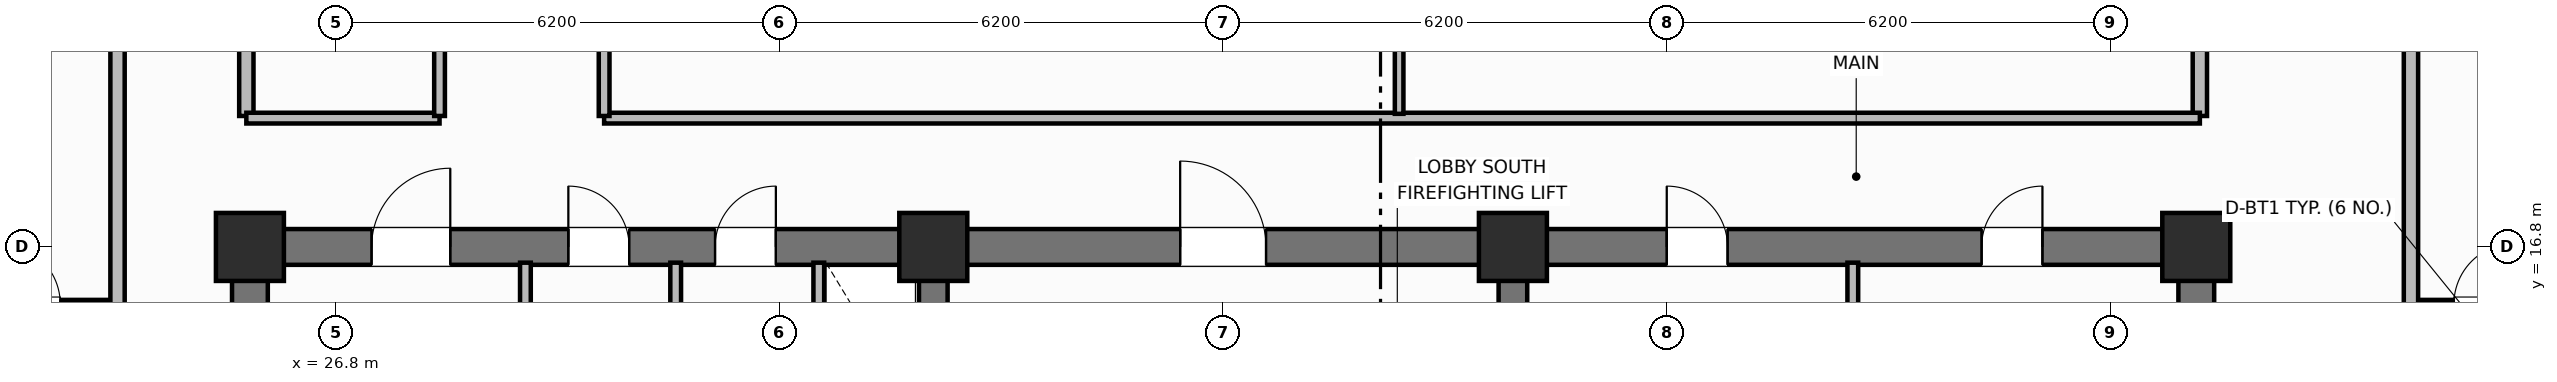
"""IFC4 building model, lengths in metres.
Left out: names, types, materials, properties, quantities, classifications, styles, units other than length and angle.
Written with IfcOpenShell. Run it as: python <this file> out.ifc"""

import sys

from ifc_helpers import new_model, si_unit, direction, frame, frame_2d, origin, origin_2d, place, context, subcontext, project, spatial, rectangle, extrude, element, fill, save


model = new_model("IFC4")
c1 = context("Model", 3, precision=1e-05, world=origin(), true_north=direction((0.0, 1.0)))
c2 = subcontext(c1, "Body", "Model", "MODEL_VIEW")
j1 = project(units=[si_unit("LENGTHUNIT", "METRE"), si_unit("PLANEANGLEUNIT", "RADIAN")], contexts=[c1])
p1 = place(None, origin())
s1 = spatial("IfcSite", under=j1, at=p1, CompositionType="ELEMENT")
p2 = place(p1, origin())
s2 = spatial("IfcBuilding", under=s1, at=p2, CompositionType="ELEMENT")
p3 = place(p2, frame((0.0, 0.0, 192.2)))
s3 = spatial("IfcBuildingStorey", under=s2, at=p3, CompositionType="ELEMENT", Elevation=192.2)
for number, where, z_axis, x_axis in (
    (1, (25.6, 10.85, 0.0), (0.0, 0.0, 1.0), (0.0, 1.0, 0.0)),
    (2, (52.8, 10.85, 0.0), (0.0, 0.0, 1.0), (0.0, 1.0, 0.0)),
):
    element("IfcWall", number, at=place(p3, frame(where, z_axis=z_axis, x_axis=x_axis)), inside=s3, PredefinedType="SHEAR", context=c2, shape_type="SweptSolid", body=[
        extrude(rectangle(XDim=5.7, YDim=0.5, at=frame_2d((2.85, 0.0))), origin(), (0.0, 0.0, 1.0), 3.7),
    ])
p4 = place(p3, frame((25.6, 16.8, 0.0), z_axis=(0.0, 0.0, 1.0), x_axis=(1.0, 0.0, 0.0)))
e3 = element("IfcWall", 3, at=p4, inside=s3, PredefinedType="SHEAR", context=c2, shape_type="SweptSolid", body=[
    extrude(rectangle(XDim=27.2, YDim=0.5, at=frame_2d((13.6, 0.0))), origin(), (0.0, 0.0, 1.0), 3.7),
])
p5 = place(p4, frame((1.7, 0.0, 0.0)))
e4 = element("IfcOpeningElement", 4, at=p5, cuts=e3, PredefinedType="OPENING", context=c2, shape_type="SweptSolid", body=[
    extrude(rectangle(XDim=1.1, YDim=2.15, at=frame_2d((0.55, 1.075))), frame((0.0, 0.26, 0.0), z_axis=(0.0, -1.0, 0.0), x_axis=(1.0, 0.0, 0.0)), (0.0, 0.0, 1.0), 0.52),
])
p6 = place(p4, frame((4.45, 0.0, 0.0)))
e5 = element("IfcOpeningElement", 5, at=p6, cuts=e3, PredefinedType="OPENING", context=c2, shape_type="SweptSolid", body=[
    extrude(rectangle(XDim=0.85, YDim=2.1, at=frame_2d((0.425, 1.05))), frame((0.0, 0.26, 0.0), z_axis=(0.0, -1.0, 0.0), x_axis=(1.0, 0.0, 0.0)), (0.0, 0.0, 1.0), 0.52),
])
p7 = place(p4, frame((6.5, 0.0, 0.0)))
e6 = element("IfcOpeningElement", 6, at=p7, cuts=e3, PredefinedType="OPENING", context=c2, shape_type="SweptSolid", body=[
    extrude(rectangle(XDim=0.85, YDim=2.1, at=frame_2d((0.425, 1.05))), frame((0.0, 0.26, 0.0), z_axis=(0.0, -1.0, 0.0), x_axis=(1.0, 0.0, 0.0)), (0.0, 0.0, 1.0), 0.52),
])
p8 = place(p4, frame((13.0, 0.0, 0.0)))
e7 = element("IfcOpeningElement", 7, at=p8, cuts=e3, PredefinedType="OPENING", context=c2, shape_type="SweptSolid", body=[
    extrude(rectangle(XDim=1.2, YDim=2.15, at=frame_2d((0.6, 1.075))), frame((0.0, 0.26, 0.0), z_axis=(0.0, -1.0, 0.0), x_axis=(1.0, 0.0, 0.0)), (0.0, 0.0, 1.0), 0.52),
])
p9 = place(p4, frame((19.8, 0.0, 0.0)))
e8 = element("IfcOpeningElement", 8, at=p9, cuts=e3, PredefinedType="OPENING", context=c2, shape_type="SweptSolid", body=[
    extrude(rectangle(XDim=0.85, YDim=2.1, at=frame_2d((0.425, 1.05))), frame((0.0, 0.26, 0.0), z_axis=(0.0, -1.0, 0.0), x_axis=(1.0, 0.0, 0.0)), (0.0, 0.0, 1.0), 0.52),
])
p10 = place(p4, frame((24.2, 0.0, 0.0)))
e9 = element("IfcOpeningElement", 9, at=p10, cuts=e3, PredefinedType="OPENING", context=c2, shape_type="SweptSolid", body=[
    extrude(rectangle(XDim=0.85, YDim=2.1, at=frame_2d((0.425, 1.05))), frame((0.0, 0.26, 0.0), z_axis=(0.0, -1.0, 0.0), x_axis=(1.0, 0.0, 0.0)), (0.0, 0.0, 1.0), 0.52),
])
for number, where, z_axis, x_axis in (
    (10, (35.15, 10.85, 0.0), (0.0, 0.0, 1.0), (0.0, 1.0, 0.0)),
    (11, (43.25, 10.85, 0.0), (0.0, 0.0, 1.0), (0.0, 1.0, 0.0)),
):
    element("IfcWall", number, at=place(p3, frame(where, z_axis=z_axis, x_axis=x_axis)), inside=s3, PredefinedType="SHEAR", context=c2, shape_type="SweptSolid", body=[
        extrude(rectangle(XDim=5.7, YDim=0.4, at=frame_2d((2.85, 0.0))), origin(), (0.0, 0.0, 1.0), 3.7),
    ])
for number, where, z_axis, x_axis in (
    (12, (25.6, 16.8, 0.0), (0.0, 0.0, 1.0), (1.0, 0.0, 0.0)),
    (13, (35.15, 16.8, 0.0), (0.0, 0.0, 1.0), (1.0, 0.0, 0.0)),
    (14, (43.25, 16.8, 0.0), (0.0, 0.0, 1.0), (1.0, 0.0, 0.0)),
    (15, (52.8, 16.8, 0.0), (0.0, 0.0, 1.0), (1.0, 0.0, 0.0)),
):
    element("IfcColumn", number, at=place(p3, frame(where, z_axis=z_axis, x_axis=x_axis)), inside=s3, PredefinedType="COLUMN", context=c2, shape_type="SweptSolid", body=[
        extrude(rectangle(XDim=0.95, YDim=0.95, at=origin_2d()), origin(), (0.0, 0.0, 1.0), 3.7),
    ])
for number, where, z_axis, x_axis in (
    (16, (29.45, 14.5, 0.0), (0.0, 0.0, 1.0), (0.0, 1.0, 0.0)),
    (17, (31.55, 14.5, 0.0), (0.0, 0.0, 1.0), (0.0, 1.0, 0.0)),
):
    element("IfcWall", number, at=place(p3, frame(where, z_axis=z_axis, x_axis=x_axis)), inside=s3, PredefinedType="PARTITIONING", context=c2, shape_type="SweptSolid", body=[
        extrude(rectangle(XDim=2.08, YDim=0.15, at=frame_2d((1.04, 0.0))), origin(), (0.0, 0.0, 1.0), 2.49),
    ])
p11 = place(p3, frame((33.55, 14.5, 0.0), z_axis=(0.0, 0.0, 1.0), x_axis=(0.0, 1.0, 0.0)))
e18 = element("IfcWall", 18, at=p11, inside=s3, PredefinedType="PARTITIONING", context=c2, shape_type="SweptSolid", body=[
    extrude(rectangle(XDim=2.08, YDim=0.15, at=frame_2d((1.04, 0.0))), origin(), (0.0, 0.0, 1.0), 2.49),
])
p12 = place(p11, frame((0.55, 0.0, 0.0)))
e19 = element("IfcOpeningElement", 19, at=p12, cuts=e18, PredefinedType="OPENING", context=c2, shape_type="SweptSolid", body=[
    extrude(rectangle(XDim=0.85, YDim=2.05, at=frame_2d((0.425, 1.025))), frame((0.0, 0.085, 0.0), z_axis=(0.0, -1.0, 0.0), x_axis=(1.0, 0.0, 0.0)), (0.0, 0.0, 1.0), 0.17),
])
p13 = place(p3, frame((48.0, 10.95, 0.0), z_axis=(0.0, 0.0, 1.0), x_axis=(0.0, 1.0, 0.0)))
e20 = element("IfcWall", 20, at=p13, inside=s3, PredefinedType="PARTITIONING", context=c2, shape_type="SweptSolid", body=[
    extrude(rectangle(XDim=5.63, YDim=0.15, at=frame_2d((2.815, 0.0))), origin(), (0.0, 0.0, 1.0), 2.49),
])
for number, where, z_axis, x_axis in (
    (21, (25.55, 18.63, 0.0), (0.0, 0.0, 1.0), (0.0, 1.0, 0.0)),
    (22, (52.85, 18.63, 0.0), (0.0, 0.0, 1.0), (0.0, 1.0, 0.0)),
):
    element("IfcWall", number, at=place(p3, frame(where, z_axis=z_axis, x_axis=x_axis)), inside=s3, PredefinedType="PARTITIONING", context=c2, shape_type="SweptSolid", body=[
        extrude(rectangle(XDim=19.14, YDim=0.2, at=frame_2d((9.57, 0.0))), origin(), (0.0, 0.0, 1.0), 2.49),
    ])
p14 = place(p3, frame((25.55, 18.6, 0.0), z_axis=(0.0, 0.0, 1.0), x_axis=(1.0, 0.0, 0.0)))
e23 = element("IfcWall", 23, at=p14, inside=s3, PredefinedType="PARTITIONING", context=c2, shape_type="SweptSolid", body=[
    extrude(rectangle(XDim=2.7, YDim=0.15, at=frame_2d((1.35, 0.0))), origin(), (0.0, 0.0, 1.0), 2.49),
])
p15 = place(p3, frame((30.55, 18.6, 0.0), z_axis=(0.0, 0.0, 1.0), x_axis=(1.0, 0.0, 0.0)))
e24 = element("IfcWall", 24, at=p15, inside=s3, PredefinedType="PARTITIONING", context=c2, shape_type="SweptSolid", body=[
    extrude(rectangle(XDim=22.3, YDim=0.15, at=frame_2d((11.15, 0.0))), origin(), (0.0, 0.0, 1.0), 2.49),
])
p16 = place(p3, frame((41.66, 18.66, 0.0), z_axis=(0.0, 0.0, 1.0), x_axis=(0.0, 1.0, 0.0)))
e25 = element("IfcWall", 25, at=p16, inside=s3, PredefinedType="PARTITIONING", context=c2, shape_type="SweptSolid", body=[
    extrude(rectangle(XDim=6.821, YDim=0.12, at=frame_2d((3.41, 0.0))), origin(), (0.0, 0.0, 1.0), 2.49),
])
p17 = place(p16, frame((2.0, 0.0, 0.0)))
e26 = element("IfcOpeningElement", 26, at=p17, cuts=e25, PredefinedType="OPENING", context=c2, shape_type="SweptSolid", body=[
    extrude(rectangle(XDim=0.9, YDim=2.1, at=frame_2d((0.45, 1.05))), frame((0.0, 0.07, 0.0), z_axis=(0.0, -1.0, 0.0), x_axis=(1.0, 0.0, 0.0)), (0.0, 0.0, 1.0), 0.14),
])
p18 = place(p3, frame((28.25, 18.63, 0.0), z_axis=(0.0, 0.0, 1.0), x_axis=(0.0, 1.0, 0.0)))
e27 = element("IfcWall", 27, at=p18, inside=s3, PredefinedType="PARTITIONING", context=c2, shape_type="SweptSolid", body=[
    extrude(rectangle(XDim=19.14, YDim=0.15, at=frame_2d((9.57, 0.0))), origin(), (0.0, 0.0, 1.0), 2.49),
])
p19 = place(p18, frame((3.0, 0.0, 0.0)))
e28 = element("IfcOpeningElement", 28, at=p19, cuts=e27, PredefinedType="OPENING", context=c2, shape_type="SweptSolid", body=[
    extrude(rectangle(XDim=0.9, YDim=2.1, at=frame_2d((0.45, 1.05))), frame((0.0, 0.085, 0.0), z_axis=(0.0, -1.0, 0.0), x_axis=(1.0, 0.0, 0.0)), (0.0, 0.0, 1.0), 0.17),
])
p20 = place(p18, frame((11.5, 0.0, 0.0)))
e29 = element("IfcOpeningElement", 29, at=p20, cuts=e27, PredefinedType="OPENING", context=c2, shape_type="SweptSolid", body=[
    extrude(rectangle(XDim=0.9, YDim=2.1, at=frame_2d((0.45, 1.05))), frame((0.0, 0.085, 0.0), z_axis=(0.0, -1.0, 0.0), x_axis=(1.0, 0.0, 0.0)), (0.0, 0.0, 1.0), 0.17),
])
p21 = place(p3, frame((30.55, 18.63, 0.0), z_axis=(0.0, 0.0, 1.0), x_axis=(0.0, 1.0, 0.0)))
e30 = element("IfcWall", 30, at=p21, inside=s3, PredefinedType="PARTITIONING", context=c2, shape_type="SweptSolid", body=[
    extrude(rectangle(XDim=19.14, YDim=0.15, at=frame_2d((9.57, 0.0))), origin(), (0.0, 0.0, 1.0), 2.49),
])
p22 = place(p21, frame((2.2, 0.0, 0.0)))
e31 = element("IfcOpeningElement", 31, at=p22, cuts=e30, PredefinedType="OPENING", context=c2, shape_type="SweptSolid", body=[
    extrude(rectangle(XDim=1.0, YDim=2.15, at=frame_2d((0.5, 1.075))), frame((0.0, 0.085, 0.0), z_axis=(0.0, -1.0, 0.0), x_axis=(1.0, 0.0, 0.0)), (0.0, 0.0, 1.0), 0.17),
])
p23 = place(p21, frame((8.89, 0.0, 0.0)))
e32 = element("IfcOpeningElement", 32, at=p23, cuts=e30, PredefinedType="OPENING", context=c2, shape_type="SweptSolid", body=[
    extrude(rectangle(XDim=1.0, YDim=2.15, at=frame_2d((0.5, 1.075))), frame((0.0, 0.085, 0.0), z_axis=(0.0, -1.0, 0.0), x_axis=(1.0, 0.0, 0.0)), (0.0, 0.0, 1.0), 0.17),
])
p24 = place(p3, frame((21.5, 16.0, 0.0), z_axis=(0.0, 0.0, 1.0), x_axis=(1.0, 0.0, 0.0)))
e33 = element("IfcWall", 33, at=p24, inside=s3, PredefinedType="PARTITIONING", context=c2, shape_type="SweptSolid", body=[
    extrude(rectangle(XDim=2.25, YDim=0.12, at=frame_2d((1.125, 0.0))), origin(), (0.0, 0.0, 1.0), 2.49),
])
p25 = place(p24, frame((0.6, 0.0, 0.0)))
e34 = element("IfcOpeningElement", 34, at=p25, cuts=e33, PredefinedType="OPENING", context=c2, shape_type="SweptSolid", body=[
    extrude(rectangle(XDim=0.85, YDim=2.1, at=frame_2d((0.425, 1.05))), frame((0.0, 0.07, 0.0), z_axis=(0.0, -1.0, 0.0), x_axis=(1.0, 0.0, 0.0)), (0.0, 0.0, 1.0), 0.14),
])
p26 = place(p3, frame((23.75, 10.6, 0.0), z_axis=(0.0, 0.0, 1.0), x_axis=(0.0, 1.0, 0.0)))
e35 = element("IfcWall", 35, at=p26, inside=s3, PredefinedType="PARTITIONING", context=c2, shape_type="SweptSolid", body=[
    extrude(rectangle(XDim=35.2, YDim=0.2, at=frame_2d((17.6, 0.0))), origin(), (0.0, 0.0, 1.0), 2.49),
])
p27 = place(p26, frame((2.65, 0.0, 0.0)))
e36 = element("IfcOpeningElement", 36, at=p27, cuts=e35, PredefinedType="OPENING", context=c2, shape_type="SweptSolid", body=[
    extrude(rectangle(XDim=1.0, YDim=2.15, at=frame_2d((0.5, 1.075))), frame((0.0, 0.11, 0.0), z_axis=(0.0, -1.0, 0.0), x_axis=(1.0, 0.0, 0.0)), (0.0, 0.0, 1.0), 0.22),
])
p28 = place(p26, frame((13.222, 0.0, 0.0)))
e37 = element("IfcOpeningElement", 37, at=p28, cuts=e35, PredefinedType="OPENING", context=c2, shape_type="SweptSolid", body=[
    extrude(rectangle(XDim=1.0, YDim=2.15, at=frame_2d((0.5, 1.075))), frame((0.0, 0.11, 0.0), z_axis=(0.0, -1.0, 0.0), x_axis=(1.0, 0.0, 0.0)), (0.0, 0.0, 1.0), 0.22),
])
p29 = place(p26, frame((24.838, 0.0, 0.0)))
e38 = element("IfcOpeningElement", 38, at=p29, cuts=e35, PredefinedType="OPENING", context=c2, shape_type="SweptSolid", body=[
    extrude(rectangle(XDim=1.0, YDim=2.15, at=frame_2d((0.5, 1.075))), frame((0.0, 0.11, 0.0), z_axis=(0.0, -1.0, 0.0), x_axis=(1.0, 0.0, 0.0)), (0.0, 0.0, 1.0), 0.22),
])
p30 = place(p3, frame((55.8, 16.0, 0.0), z_axis=(0.0, 0.0, 1.0), x_axis=(1.0, 0.0, 0.0)))
e39 = element("IfcWall", 39, at=p30, inside=s3, PredefinedType="PARTITIONING", context=c2, shape_type="SweptSolid", body=[
    extrude(rectangle(XDim=2.25, YDim=0.12, at=frame_2d((1.125, 0.0))), origin(), (0.0, 0.0, 1.0), 2.49),
])
p31 = place(p30, frame((0.6, 0.0, 0.0)))
e40 = element("IfcOpeningElement", 40, at=p31, cuts=e39, PredefinedType="OPENING", context=c2, shape_type="SweptSolid", body=[
    extrude(rectangle(XDim=0.85, YDim=2.1, at=frame_2d((0.425, 1.05))), frame((0.0, 0.07, 0.0), z_axis=(0.0, -1.0, 0.0), x_axis=(1.0, 0.0, 0.0)), (0.0, 0.0, 1.0), 0.14),
])
p32 = place(p3, frame((55.8, 10.6, 0.0), z_axis=(0.0, 0.0, 1.0), x_axis=(0.0, 1.0, 0.0)))
e41 = element("IfcWall", 41, at=p32, inside=s3, PredefinedType="PARTITIONING", context=c2, shape_type="SweptSolid", body=[
    extrude(rectangle(XDim=35.2, YDim=0.2, at=frame_2d((17.6, 0.0))), origin(), (0.0, 0.0, 1.0), 2.49),
])
p33 = place(p32, frame((2.65, 0.0, 0.0)))
e42 = element("IfcOpeningElement", 42, at=p33, cuts=e41, PredefinedType="OPENING", context=c2, shape_type="SweptSolid", body=[
    extrude(rectangle(XDim=1.0, YDim=2.15, at=frame_2d((0.5, 1.075))), frame((0.0, 0.11, 0.0), z_axis=(0.0, -1.0, 0.0), x_axis=(1.0, 0.0, 0.0)), (0.0, 0.0, 1.0), 0.22),
])
p34 = place(p32, frame((12.87, 0.0, 0.0)))
e43 = element("IfcOpeningElement", 43, at=p34, cuts=e41, PredefinedType="OPENING", context=c2, shape_type="SweptSolid", body=[
    extrude(rectangle(XDim=1.0, YDim=2.15, at=frame_2d((0.5, 1.075))), frame((0.0, 0.11, 0.0), z_axis=(0.0, -1.0, 0.0), x_axis=(1.0, 0.0, 0.0)), (0.0, 0.0, 1.0), 0.22),
])
p35 = place(p32, frame((23.65, 0.0, 0.0)))
e44 = element("IfcOpeningElement", 44, at=p35, cuts=e41, PredefinedType="OPENING", context=c2, shape_type="SweptSolid", body=[
    extrude(rectangle(XDim=1.0, YDim=2.15, at=frame_2d((0.5, 1.075))), frame((0.0, 0.11, 0.0), z_axis=(0.0, -1.0, 0.0), x_axis=(1.0, 0.0, 0.0)), (0.0, 0.0, 1.0), 0.22),
])
p36 = place(p25, origin())
e45 = element("IfcDoor", 45, at=p36, inside=s3, OperationType="SINGLE_SWING_LEFT", PredefinedType="DOOR", context=c2, shape_type="SweptSolid", body=[
    extrude(rectangle(XDim=0.85, YDim=2.1, at=frame_2d((0.425, 1.05))), frame((0.0, 0.025, 0.0), z_axis=(0.0, -1.0, 0.0), x_axis=(1.0, 0.0, 0.0)), (0.0, 0.0, 1.0), 0.05),
])
fill(e34, e45)
p37 = place(p31, origin())
e46 = element("IfcDoor", 46, at=p37, inside=s3, OperationType="SINGLE_SWING_RIGHT", PredefinedType="DOOR", context=c2, shape_type="SweptSolid", body=[
    extrude(rectangle(XDim=0.85, YDim=2.1, at=frame_2d((0.425, 1.05))), frame((0.0, 0.025, 0.0), z_axis=(0.0, -1.0, 0.0), x_axis=(1.0, 0.0, 0.0)), (0.0, 0.0, 1.0), 0.05),
])
fill(e40, e46)
p38 = place(p5, origin())
e47 = element("IfcDoor", 47, at=p38, inside=s3, OperationType="SINGLE_SWING_RIGHT", PredefinedType="DOOR", context=c2, shape_type="SweptSolid", body=[
    extrude(rectangle(XDim=1.1, YDim=2.15, at=frame_2d((0.55, 1.075))), frame((0.0, 0.025, 0.0), z_axis=(0.0, -1.0, 0.0), x_axis=(1.0, 0.0, 0.0)), (0.0, 0.0, 1.0), 0.05),
])
fill(e4, e47)
p39 = place(p6, origin())
e48 = element("IfcDoor", 48, at=p39, inside=s3, OperationType="SINGLE_SWING_LEFT", PredefinedType="DOOR", context=c2, shape_type="SweptSolid", body=[
    extrude(rectangle(XDim=0.85, YDim=2.1, at=frame_2d((0.425, 1.05))), frame((0.0, 0.025, 0.0), z_axis=(0.0, -1.0, 0.0), x_axis=(1.0, 0.0, 0.0)), (0.0, 0.0, 1.0), 0.05),
])
fill(e5, e48)
p40 = place(p7, origin())
e49 = element("IfcDoor", 49, at=p40, inside=s3, OperationType="SINGLE_SWING_RIGHT", PredefinedType="DOOR", context=c2, shape_type="SweptSolid", body=[
    extrude(rectangle(XDim=0.85, YDim=2.1, at=frame_2d((0.425, 1.05))), frame((0.0, 0.025, 0.0), z_axis=(0.0, -1.0, 0.0), x_axis=(1.0, 0.0, 0.0)), (0.0, 0.0, 1.0), 0.05),
])
fill(e6, e49)
p41 = place(p8, origin())
e50 = element("IfcDoor", 50, at=p41, inside=s3, OperationType="SINGLE_SWING_LEFT", PredefinedType="DOOR", context=c2, shape_type="SweptSolid", body=[
    extrude(rectangle(XDim=1.2, YDim=2.15, at=frame_2d((0.6, 1.075))), frame((0.0, 0.025, 0.0), z_axis=(0.0, -1.0, 0.0), x_axis=(1.0, 0.0, 0.0)), (0.0, 0.0, 1.0), 0.05),
])
fill(e7, e50)
p42 = place(p9, origin())
e51 = element("IfcDoor", 51, at=p42, inside=s3, OperationType="SINGLE_SWING_LEFT", PredefinedType="DOOR", context=c2, shape_type="SweptSolid", body=[
    extrude(rectangle(XDim=0.85, YDim=2.1, at=frame_2d((0.425, 1.05))), frame((0.0, 0.025, 0.0), z_axis=(0.0, -1.0, 0.0), x_axis=(1.0, 0.0, 0.0)), (0.0, 0.0, 1.0), 0.05),
])
fill(e8, e51)
p43 = place(p10, origin())
e52 = element("IfcDoor", 52, at=p43, inside=s3, OperationType="SINGLE_SWING_RIGHT", PredefinedType="DOOR", context=c2, shape_type="SweptSolid", body=[
    extrude(rectangle(XDim=0.85, YDim=2.1, at=frame_2d((0.425, 1.05))), frame((0.0, 0.025, 0.0), z_axis=(0.0, -1.0, 0.0), x_axis=(1.0, 0.0, 0.0)), (0.0, 0.0, 1.0), 0.05),
])
fill(e9, e52)
save(model, sys.argv[1])
